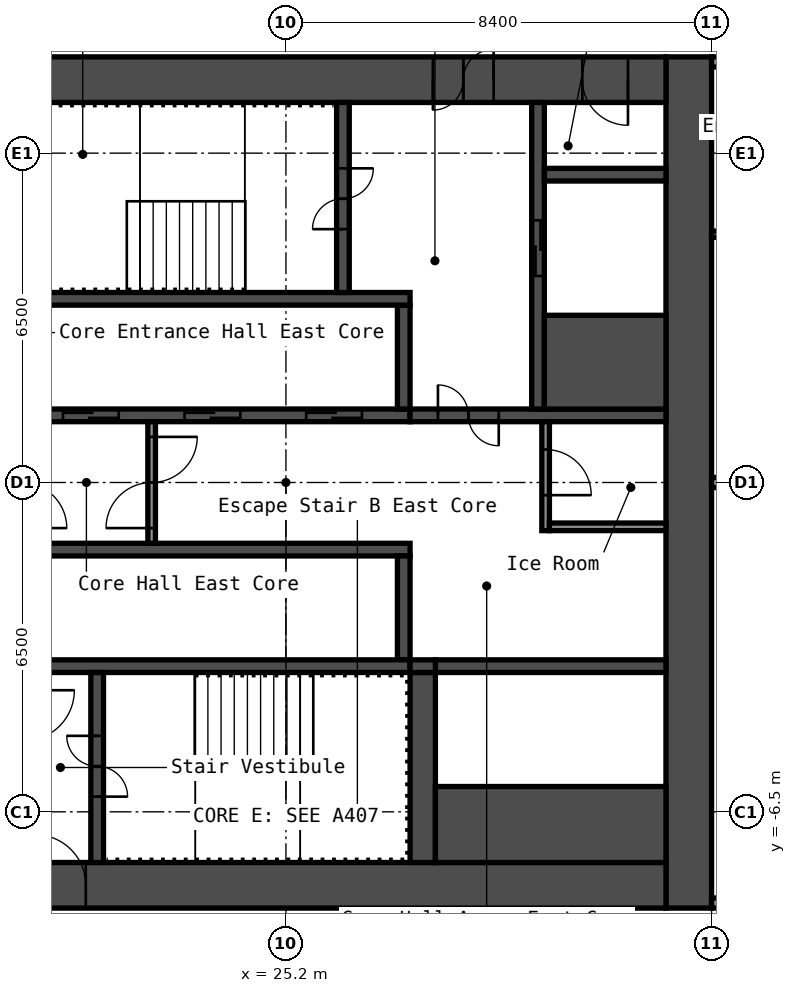
"""IFC4 building model, lengths in metres.
Left out: names, types, materials, properties, quantities, classifications, styles, units other than length and angle.
Written with IfcOpenShell. Run it as: python <this file> out.ifc"""

import sys

from ifc_helpers import new_model, si_unit, direction, frame, frame_2d, origin, place, context, subcontext, project, spatial, rectangle, extrude, element, fill, save


model = new_model("IFC4")
c1 = context("Model", 3, precision=1e-05, world=origin(), true_north=direction((0.0, 1.0)))
c2 = subcontext(c1, "Body", "Model", "MODEL_VIEW")
j1 = project(units=[si_unit("LENGTHUNIT", "METRE"), si_unit("PLANEANGLEUNIT", "RADIAN")], contexts=[c1])
p1 = place(None, origin())
s1 = spatial("IfcSite", under=j1, at=p1, CompositionType="ELEMENT")
p2 = place(p1, origin())
s2 = spatial("IfcBuilding", under=s1, at=p2, CompositionType="ELEMENT")
p3 = place(p2, frame((0.0, 0.0, 51.8)))
s3 = spatial("IfcBuildingStorey", under=s2, at=p3, CompositionType="ELEMENT", Elevation=51.8)
p4 = place(p3, frame((33.15, -8.4, 0.0), z_axis=(0.0, 0.0, 1.0), x_axis=(0.0, 1.0, 0.0)))
e1 = element("IfcWall", 1, at=p4, inside=s3, PredefinedType="SHEAR", context=c2, shape_type="SweptSolid", body=[
    extrude(rectangle(XDim=16.8, YDim=0.9, at=frame_2d((8.4, 0.0))), origin(), (0.0, 0.0, 1.0), 2.8),
])
p5 = place(p3, frame((17.7, 7.95, 0.0), z_axis=(0.0, 0.0, 1.0), x_axis=(1.0, 0.0, 0.0)))
e2 = element("IfcWall", 2, at=p5, inside=s3, PredefinedType="SHEAR", context=c2, shape_type="SweptSolid", body=[
    extrude(rectangle(XDim=15.0, YDim=0.9, at=frame_2d((7.5, 0.0))), origin(), (0.0, 0.0, 1.0), 2.8),
])
p6 = place(p5, frame((10.4, 0.0, 0.0)))
e3 = element("IfcOpeningElement", 3, at=p6, cuts=e2, PredefinedType="OPENING", context=c2, shape_type="SweptSolid", body=[
    extrude(rectangle(XDim=1.2, YDim=2.1, at=frame_2d((0.6, 1.05))), frame((0.0, 0.46, 0.0), z_axis=(0.0, -1.0, 0.0), x_axis=(1.0, 0.0, 0.0)), (0.0, 0.0, 1.0), 0.92),
])
p7 = place(p5, frame((13.35, 0.0, 0.0)))
e4 = element("IfcOpeningElement", 4, at=p7, cuts=e2, PredefinedType="OPENING", context=c2, shape_type="SweptSolid", body=[
    extrude(rectangle(XDim=0.9, YDim=2.1, at=frame_2d((0.45, 1.05))), frame((0.0, 0.46, 0.0), z_axis=(0.0, -1.0, 0.0), x_axis=(1.0, 0.0, 0.0)), (0.0, 0.0, 1.0), 0.92),
])
p8 = place(p3, frame((17.7, -7.95, 0.0), z_axis=(0.0, 0.0, 1.0), x_axis=(1.0, 0.0, 0.0)))
e5 = element("IfcWall", 5, at=p8, inside=s3, PredefinedType="SHEAR", context=c2, shape_type="SweptSolid", body=[
    extrude(rectangle(XDim=15.0, YDim=0.9, at=frame_2d((7.5, 0.0))), origin(), (0.0, 0.0, 1.0), 2.8),
])
p9 = place(p8, frame((2.55, 0.0, 0.0)))
e6 = element("IfcOpeningElement", 6, at=p9, cuts=e5, PredefinedType="OPENING", context=c2, shape_type="SweptSolid", body=[
    extrude(rectangle(XDim=1.0, YDim=2.1, at=frame_2d((0.5, 1.05))), frame((0.0, 0.46, 0.0), z_axis=(0.0, -1.0, 0.0), x_axis=(1.0, 0.0, 0.0)), (0.0, 0.0, 1.0), 0.92),
])
p10 = place(p3, frame((20.15, 1.325, 0.0), z_axis=(0.0, 0.0, 1.0), x_axis=(1.0, 0.0, 0.0)))
e7 = element("IfcWall", 7, at=p10, inside=s3, PredefinedType="SHEAR", context=c2, shape_type="SweptSolid", body=[
    extrude(rectangle(XDim=7.5, YDim=0.25, at=frame_2d((3.75, 0.0))), origin(), (0.0, 0.0, 1.0), 2.8),
])
p11 = place(p10, frame((0.65, 0.0, 0.0)))
e8 = element("IfcOpeningElement", 8, at=p11, cuts=e7, PredefinedType="OPENING", context=c2, shape_type="SweptSolid", body=[
    extrude(rectangle(XDim=1.1, YDim=2.1, at=frame_2d((0.55, 1.05))), frame((0.0, 0.135, 0.0), z_axis=(0.0, -1.0, 0.0), x_axis=(1.0, 0.0, 0.0)), (0.0, 0.0, 1.0), 0.27),
])
p12 = place(p10, frame((3.05, 0.0, 0.0)))
e9 = element("IfcOpeningElement", 9, at=p12, cuts=e7, PredefinedType="OPENING", context=c2, shape_type="SweptSolid", body=[
    extrude(rectangle(XDim=1.1, YDim=2.1, at=frame_2d((0.55, 1.05))), frame((0.0, 0.135, 0.0), z_axis=(0.0, -1.0, 0.0), x_axis=(1.0, 0.0, 0.0)), (0.0, 0.0, 1.0), 0.27),
])
p13 = place(p10, frame((5.45, 0.0, 0.0)))
e10 = element("IfcOpeningElement", 10, at=p13, cuts=e7, PredefinedType="OPENING", context=c2, shape_type="SweptSolid", body=[
    extrude(rectangle(XDim=1.1, YDim=2.1, at=frame_2d((0.55, 1.05))), frame((0.0, 0.135, 0.0), z_axis=(0.0, -1.0, 0.0), x_axis=(1.0, 0.0, 0.0)), (0.0, 0.0, 1.0), 0.27),
])
p14 = place(p3, frame((27.525, 1.45, 0.0), z_axis=(0.0, 0.0, 1.0), x_axis=(0.0, 1.0, 0.0)))
e11 = element("IfcWall", 11, at=p14, inside=s3, PredefinedType="SHEAR", context=c2, shape_type="SweptSolid", body=[
    extrude(rectangle(XDim=2.05, YDim=0.25, at=frame_2d((1.025, 0.0))), origin(), (0.0, 0.0, 1.0), 2.8),
])
p15 = place(p3, frame((20.15, 3.625, 0.0), z_axis=(0.0, 0.0, 1.0), x_axis=(1.0, 0.0, 0.0)))
e12 = element("IfcWall", 12, at=p15, inside=s3, PredefinedType="SHEAR", context=c2, shape_type="SweptSolid", body=[
    extrude(rectangle(XDim=7.5, YDim=0.25, at=frame_2d((3.75, 0.0))), origin(), (0.0, 0.0, 1.0), 2.8),
])
p16 = place(p3, frame((26.325, 3.75, 0.0), z_axis=(0.0, 0.0, 1.0), x_axis=(0.0, 1.0, 0.0)))
e13 = element("IfcWall", 13, at=p16, inside=s3, PredefinedType="SHEAR", context=c2, shape_type="SweptSolid", body=[
    extrude(rectangle(XDim=3.75, YDim=0.25, at=frame_2d((1.875, 0.0))), origin(), (0.0, 0.0, 1.0), 2.8),
])
p17 = place(p16, frame((1.25, 0.0, 0.0)))
e14 = element("IfcOpeningElement", 14, at=p17, cuts=e13, PredefinedType="OPENING", context=c2, shape_type="SweptSolid", body=[
    extrude(rectangle(XDim=1.2, YDim=2.1, at=frame_2d((0.6, 1.05))), frame((0.0, 0.135, 0.0), z_axis=(0.0, -1.0, 0.0), x_axis=(1.0, 0.0, 0.0)), (0.0, 0.0, 1.0), 0.27),
])
p18 = place(p3, frame((27.65, 1.325, 0.0), z_axis=(0.0, 0.0, 1.0), x_axis=(1.0, 0.0, 0.0)))
e15 = element("IfcWall", 15, at=p18, inside=s3, PredefinedType="SHEAR", context=c2, shape_type="SweptSolid", body=[
    extrude(rectangle(XDim=5.05, YDim=0.25, at=frame_2d((2.525, 0.0))), origin(), (0.0, 0.0, 1.0), 2.8),
])
p19 = place(p18, frame((0.55, 0.0, 0.0)))
e16 = element("IfcOpeningElement", 16, at=p19, cuts=e15, PredefinedType="OPENING", context=c2, shape_type="SweptSolid", body=[
    extrude(rectangle(XDim=1.2, YDim=2.1, at=frame_2d((0.6, 1.05))), frame((0.0, 0.135, 0.0), z_axis=(0.0, -1.0, 0.0), x_axis=(1.0, 0.0, 0.0)), (0.0, 0.0, 1.0), 0.27),
])
p20 = place(p3, frame((30.175, 1.45, 0.0), z_axis=(0.0, 0.0, 1.0), x_axis=(0.0, 1.0, 0.0)))
e17 = element("IfcWall", 17, at=p20, inside=s3, PredefinedType="SHEAR", context=c2, shape_type="SweptSolid", body=[
    extrude(rectangle(XDim=6.05, YDim=0.25, at=frame_2d((3.025, 0.0))), origin(), (0.0, 0.0, 1.0), 2.8),
])
p21 = place(p20, frame((2.625, 0.0, 0.0)))
e18 = element("IfcOpeningElement", 18, at=p21, cuts=e17, PredefinedType="OPENING", context=c2, shape_type="SweptSolid", body=[
    extrude(rectangle(XDim=1.1, YDim=2.1, at=frame_2d((0.55, 1.05))), frame((0.0, 0.135, 0.0), z_axis=(0.0, -1.0, 0.0), x_axis=(1.0, 0.0, 0.0)), (0.0, 0.0, 1.0), 0.27),
])
p22 = place(p3, frame((30.3, 2.375, 0.0), z_axis=(0.0, 0.0, 1.0), x_axis=(1.0, 0.0, 0.0)))
e19 = element("IfcWall", 19, at=p22, inside=s3, PredefinedType="SHEAR", context=c2, shape_type="SweptSolid", body=[
    extrude(rectangle(XDim=2.4, YDim=1.85, at=frame_2d((1.2, 0.0))), origin(), (0.0, 0.0, 1.0), 2.8),
])
p23 = place(p3, frame((30.3, 6.075, 0.0), z_axis=(0.0, 0.0, 1.0), x_axis=(1.0, 0.0, 0.0)))
e20 = element("IfcWall", 20, at=p23, inside=s3, PredefinedType="SHEAR", context=c2, shape_type="SweptSolid", body=[
    extrude(rectangle(XDim=2.4, YDim=0.25, at=frame_2d((1.2, 0.0))), origin(), (0.0, 0.0, 1.0), 2.8),
])
p24 = place(p3, frame((20.15, -1.325, 0.0), z_axis=(0.0, 0.0, 1.0), x_axis=(1.0, 0.0, 0.0)))
e21 = element("IfcWall", 21, at=p24, inside=s3, PredefinedType="SHEAR", context=c2, shape_type="SweptSolid", body=[
    extrude(rectangle(XDim=7.5, YDim=0.25, at=frame_2d((3.75, 0.0))), origin(), (0.0, 0.0, 1.0), 2.8),
])
p25 = place(p3, frame((27.525, -3.5, 0.0), z_axis=(0.0, 0.0, 1.0), x_axis=(0.0, 1.0, 0.0)))
e22 = element("IfcWall", 22, at=p25, inside=s3, PredefinedType="SHEAR", context=c2, shape_type="SweptSolid", body=[
    extrude(rectangle(XDim=2.05, YDim=0.25, at=frame_2d((1.025, 0.0))), origin(), (0.0, 0.0, 1.0), 2.8),
])
p26 = place(p3, frame((20.15, -3.625, 0.0), z_axis=(0.0, 0.0, 1.0), x_axis=(1.0, 0.0, 0.0)))
e23 = element("IfcWall", 23, at=p26, inside=s3, PredefinedType="SHEAR", context=c2, shape_type="SweptSolid", body=[
    extrude(rectangle(XDim=7.5, YDim=0.25, at=frame_2d((3.75, 0.0))), origin(), (0.0, 0.0, 1.0), 2.8),
])
p27 = place(p3, frame((21.475, -7.5, 0.0), z_axis=(0.0, 0.0, 1.0), x_axis=(0.0, 1.0, 0.0)))
e24 = element("IfcWall", 24, at=p27, inside=s3, PredefinedType="SHEAR", context=c2, shape_type="SweptSolid", body=[
    extrude(rectangle(XDim=3.75, YDim=0.25, at=frame_2d((1.875, 0.0))), origin(), (0.0, 0.0, 1.0), 2.8),
])
p28 = place(p27, frame((1.3, 0.0, 0.0)))
e25 = element("IfcOpeningElement", 25, at=p28, cuts=e24, PredefinedType="OPENING", context=c2, shape_type="SweptSolid", body=[
    extrude(rectangle(XDim=1.2, YDim=2.1, at=frame_2d((0.6, 1.05))), frame((0.0, 0.135, 0.0), z_axis=(0.0, -1.0, 0.0), x_axis=(1.0, 0.0, 0.0)), (0.0, 0.0, 1.0), 0.27),
])
p29 = place(p3, frame((27.9, -7.5, 0.0), z_axis=(0.0, 0.0, 1.0), x_axis=(0.0, 1.0, 0.0)))
e26 = element("IfcWall", 26, at=p29, inside=s3, PredefinedType="SHEAR", context=c2, shape_type="SweptSolid", body=[
    extrude(rectangle(XDim=3.75, YDim=0.5, at=frame_2d((1.875, 0.0))), origin(), (0.0, 0.0, 1.0), 2.8),
])
p30 = place(p3, frame((28.15, -3.625, 0.0), z_axis=(0.0, 0.0, 1.0), x_axis=(1.0, 0.0, 0.0)))
e27 = element("IfcWall", 27, at=p30, inside=s3, PredefinedType="SHEAR", context=c2, shape_type="SweptSolid", body=[
    extrude(rectangle(XDim=4.55, YDim=0.25, at=frame_2d((2.275, 0.0))), origin(), (0.0, 0.0, 1.0), 2.8),
])
p31 = place(p3, frame((28.15, -6.75, 0.0), z_axis=(0.0, 0.0, 1.0), x_axis=(1.0, 0.0, 0.0)))
e28 = element("IfcWall", 28, at=p31, inside=s3, PredefinedType="SHEAR", context=c2, shape_type="SweptSolid", body=[
    extrude(rectangle(XDim=4.55, YDim=1.5, at=frame_2d((2.275, 0.0))), origin(), (0.0, 0.0, 1.0), 2.8),
])
p32 = place(p3, frame((27.65, -3.625, 0.0), z_axis=(0.0, 0.0, 1.0), x_axis=(1.0, 0.0, 0.0)))
e29 = element("IfcWall", 29, at=p32, inside=s3, PredefinedType="SHEAR", context=c2, shape_type="SweptSolid", body=[
    extrude(rectangle(XDim=0.5, YDim=0.25, at=frame_2d((0.25, 0.0))), origin(), (0.0, 0.0, 1.0), 2.8),
])
p33 = place(p3, frame((22.55, -1.2, 0.0), z_axis=(0.0, 0.0, 1.0), x_axis=(0.0, 1.0, 0.0)))
e30 = element("IfcWall", 30, at=p33, inside=s3, PredefinedType="PARTITIONING", context=c2, shape_type="SweptSolid", body=[
    extrude(rectangle(XDim=2.4, YDim=0.15, at=frame_2d((1.2, 0.0))), origin(), (0.0, 0.0, 1.0), 2.8),
])
p34 = place(p33, frame((0.3, 0.0, 0.0)))
e31 = element("IfcOpeningElement", 31, at=p34, cuts=e30, PredefinedType="OPENING", context=c2, shape_type="SweptSolid", body=[
    extrude(rectangle(XDim=1.8, YDim=2.1, at=frame_2d((0.9, 1.05))), frame((0.0, 0.085, 0.0), z_axis=(0.0, -1.0, 0.0), x_axis=(1.0, 0.0, 0.0)), (0.0, 0.0, 1.0), 0.17),
])
p35 = place(p3, frame((30.325, -0.95, 0.0), z_axis=(0.0, 0.0, 1.0), x_axis=(0.0, 1.0, 0.0)))
e32 = element("IfcWall", 32, at=p35, inside=s3, PredefinedType="PARTITIONING", context=c2, shape_type="SweptSolid", body=[
    extrude(rectangle(XDim=2.15, YDim=0.15, at=frame_2d((1.075, 0.0))), origin(), (0.0, 0.0, 1.0), 2.8),
])
p36 = place(p35, frame((0.7, 0.0, 0.0)))
e33 = element("IfcOpeningElement", 33, at=p36, cuts=e32, PredefinedType="OPENING", context=c2, shape_type="SweptSolid", body=[
    extrude(rectangle(XDim=0.9, YDim=2.1, at=frame_2d((0.45, 1.05))), frame((0.0, 0.085, 0.0), z_axis=(0.0, -1.0, 0.0), x_axis=(1.0, 0.0, 0.0)), (0.0, 0.0, 1.0), 0.17),
])
p37 = place(p3, frame((30.4, -0.875, 0.0), z_axis=(0.0, 0.0, 1.0), x_axis=(1.0, 0.0, 0.0)))
e34 = element("IfcWall", 34, at=p37, inside=s3, PredefinedType="PARTITIONING", context=c2, shape_type="SweptSolid", body=[
    extrude(rectangle(XDim=2.3, YDim=0.15, at=frame_2d((1.15, 0.0))), origin(), (0.0, 0.0, 1.0), 2.8),
])
p38 = place(p3, frame((33.6, -8.3, 0.0), z_axis=(0.0, 0.0, 1.0), x_axis=(1.0, 0.0, 0.0)))
e35 = element("IfcWall", 35, at=p38, inside=s3, PredefinedType="PARTITIONING", context=c2, shape_type="SweptSolid", body=[
    extrude(rectangle(XDim=15.0, YDim=0.2, at=frame_2d((7.5, 0.0))), origin(), (0.0, 0.0, 1.0), 2.8),
])
p39 = place(p38, frame((2.0, 0.0, 0.0)))
e36 = element("IfcOpeningElement", 36, at=p39, cuts=e35, PredefinedType="OPENING", context=c2, shape_type="SweptSolid", body=[
    extrude(rectangle(XDim=1.0, YDim=2.1, at=frame_2d((0.5, 1.05))), frame((0.0, 0.11, 0.0), z_axis=(0.0, -1.0, 0.0), x_axis=(1.0, 0.0, 0.0)), (0.0, 0.0, 1.0), 0.22),
])
p40 = place(p38, frame((12.85, 0.0, 0.0)))
e37 = element("IfcOpeningElement", 37, at=p40, cuts=e35, PredefinedType="OPENING", context=c2, shape_type="SweptSolid", body=[
    extrude(rectangle(XDim=1.0, YDim=2.1, at=frame_2d((0.5, 1.05))), frame((0.0, 0.11, 0.0), z_axis=(0.0, -1.0, 0.0), x_axis=(1.0, 0.0, 0.0)), (0.0, 0.0, 1.0), 0.22),
])
p41 = place(p3, frame((33.6, 0.0, 0.0), z_axis=(0.0, 0.0, 1.0), x_axis=(1.0, 0.0, 0.0)))
e38 = element("IfcWall", 38, at=p41, inside=s3, PredefinedType="PARTITIONING", context=c2, shape_type="SweptSolid", body=[
    extrude(rectangle(XDim=14.9, YDim=0.2, at=frame_2d((7.45, 0.0))), origin(), (0.0, 0.0, 1.0), 2.8),
])
p42 = place(p3, frame((33.6, 4.9, 0.0), z_axis=(0.0, 0.0, 1.0), x_axis=(1.0, 0.0, 0.0)))
e39 = element("IfcWall", 39, at=p42, inside=s3, PredefinedType="PARTITIONING", context=c2, shape_type="SweptSolid", body=[
    extrude(rectangle(XDim=3.737, YDim=0.125, at=frame_2d((1.869, 0.0))), origin(), (0.0, 0.0, 1.0), 2.8),
])
p43 = place(p42, frame((1.5, 0.0, 0.0)))
e40 = element("IfcOpeningElement", 40, at=p43, cuts=e39, PredefinedType="OPENING", context=c2, shape_type="SweptSolid", body=[
    extrude(rectangle(XDim=0.8, YDim=2.1, at=frame_2d((0.4, 1.05))), frame((0.0, 0.073, 0.0), z_axis=(0.0, -1.0, 0.0), x_axis=(1.0, 0.0, 0.0)), (0.0, 0.0, 1.0), 0.145),
])
p44 = place(p3, frame((33.6, 8.3, 0.0), z_axis=(0.0, 0.0, 1.0), x_axis=(1.0, 0.0, 0.0)))
e41 = element("IfcWall", 41, at=p44, inside=s3, PredefinedType="PARTITIONING", context=c2, shape_type="SweptSolid", body=[
    extrude(rectangle(XDim=15.0, YDim=0.2, at=frame_2d((7.5, 0.0))), origin(), (0.0, 0.0, 1.0), 2.8),
])
p45 = place(p44, frame((9.55, 0.0, 0.0)))
e42 = element("IfcOpeningElement", 42, at=p45, cuts=e41, PredefinedType="OPENING", context=c2, shape_type="SweptSolid", body=[
    extrude(rectangle(XDim=1.6, YDim=2.1, at=frame_2d((0.8, 1.05))), frame((0.0, 0.11, 0.0), z_axis=(0.0, -1.0, 0.0), x_axis=(1.0, 0.0, 0.0)), (0.0, 0.0, 1.0), 0.22),
])
p46 = place(p6, origin())
e43 = element("IfcDoor", 43, at=p46, inside=s3, OperationType="DOUBLE_DOOR_SINGLE_SWING", PredefinedType="DOOR", context=c2, shape_type="SweptSolid", body=[
    extrude(rectangle(XDim=1.2, YDim=2.1, at=frame_2d((0.6, 1.05))), frame((0.0, 0.025, 0.0), z_axis=(0.0, -1.0, 0.0), x_axis=(1.0, 0.0, 0.0)), (0.0, 0.0, 1.0), 0.05),
])
fill(e3, e43)
p47 = place(p7, origin())
e44 = element("IfcDoor", 44, at=p47, inside=s3, OperationType="SINGLE_SWING_RIGHT", PredefinedType="DOOR", context=c2, shape_type="SweptSolid", body=[
    extrude(rectangle(XDim=0.9, YDim=2.1, at=frame_2d((0.45, 1.05))), frame((0.0, 0.025, 0.0), z_axis=(0.0, -1.0, 0.0), x_axis=(1.0, 0.0, 0.0)), (0.0, 0.0, 1.0), 0.05),
])
fill(e4, e44)
p48 = place(p9, origin())
e45 = element("IfcDoor", 45, at=p48, inside=s3, OperationType="SINGLE_SWING_RIGHT", PredefinedType="DOOR", context=c2, shape_type="SweptSolid", body=[
    extrude(rectangle(XDim=1.0, YDim=2.1, at=frame_2d((0.5, 1.05))), frame((0.0, 0.025, 0.0), z_axis=(0.0, -1.0, 0.0), x_axis=(1.0, 0.0, 0.0)), (0.0, 0.0, 1.0), 0.05),
])
fill(e6, e45)
p49 = place(p17, origin())
e46 = element("IfcDoor", 46, at=p49, inside=s3, OperationType="DOUBLE_DOOR_SINGLE_SWING", PredefinedType="DOOR", context=c2, shape_type="SweptSolid", body=[
    extrude(rectangle(XDim=1.2, YDim=2.1, at=frame_2d((0.6, 1.05))), frame((0.0, 0.025, 0.0), z_axis=(0.0, -1.0, 0.0), x_axis=(1.0, 0.0, 0.0)), (0.0, 0.0, 1.0), 0.05),
])
fill(e14, e46)
p50 = place(p28, origin())
e47 = element("IfcDoor", 47, at=p50, inside=s3, OperationType="DOUBLE_DOOR_SINGLE_SWING", PredefinedType="DOOR", context=c2, shape_type="SweptSolid", body=[
    extrude(rectangle(XDim=1.2, YDim=2.1, at=frame_2d((0.6, 1.05))), frame((0.0, 0.025, 0.0), z_axis=(0.0, -1.0, 0.0), x_axis=(1.0, 0.0, 0.0)), (0.0, 0.0, 1.0), 0.05),
])
fill(e25, e47)
p51 = place(p19, origin())
e48 = element("IfcDoor", 48, at=p51, inside=s3, OperationType="DOUBLE_DOOR_SINGLE_SWING", PredefinedType="DOOR", context=c2, shape_type="SweptSolid", body=[
    extrude(rectangle(XDim=1.2, YDim=2.1, at=frame_2d((0.6, 1.05))), frame((0.0, 0.025, 0.0), z_axis=(0.0, -1.0, 0.0), x_axis=(1.0, 0.0, 0.0)), (0.0, 0.0, 1.0), 0.05),
])
fill(e16, e48)
p52 = place(p34, origin())
e49 = element("IfcDoor", 49, at=p52, inside=s3, OperationType="DOUBLE_DOOR_SINGLE_SWING", PredefinedType="DOOR", context=c2, shape_type="SweptSolid", body=[
    extrude(rectangle(XDim=1.8, YDim=2.1, at=frame_2d((0.9, 1.05))), frame((0.0, 0.025, 0.0), z_axis=(0.0, -1.0, 0.0), x_axis=(1.0, 0.0, 0.0)), (0.0, 0.0, 1.0), 0.05),
])
fill(e31, e49)
p53 = place(p36, origin())
e50 = element("IfcDoor", 50, at=p53, inside=s3, OperationType="SINGLE_SWING_LEFT", PredefinedType="DOOR", context=c2, shape_type="SweptSolid", body=[
    extrude(rectangle(XDim=0.9, YDim=2.1, at=frame_2d((0.45, 1.05))), frame((0.0, 0.025, 0.0), z_axis=(0.0, -1.0, 0.0), x_axis=(1.0, 0.0, 0.0)), (0.0, 0.0, 1.0), 0.05),
])
fill(e33, e50)
p54 = place(p11, origin())
e51 = element("IfcDoor", 51, at=p54, inside=s3, OperationType="DOUBLE_DOOR_SLIDING", PredefinedType="DOOR", context=c2, shape_type="SweptSolid", body=[
    extrude(rectangle(XDim=1.1, YDim=2.1, at=frame_2d((0.55, 1.05))), frame((0.0, 0.025, 0.0), z_axis=(0.0, -1.0, 0.0), x_axis=(1.0, 0.0, 0.0)), (0.0, 0.0, 1.0), 0.05),
])
fill(e8, e51)
p55 = place(p12, origin())
e52 = element("IfcDoor", 52, at=p55, inside=s3, OperationType="DOUBLE_DOOR_SLIDING", PredefinedType="DOOR", context=c2, shape_type="SweptSolid", body=[
    extrude(rectangle(XDim=1.1, YDim=2.1, at=frame_2d((0.55, 1.05))), frame((0.0, 0.025, 0.0), z_axis=(0.0, -1.0, 0.0), x_axis=(1.0, 0.0, 0.0)), (0.0, 0.0, 1.0), 0.05),
])
fill(e9, e52)
p56 = place(p13, origin())
e53 = element("IfcDoor", 53, at=p56, inside=s3, OperationType="DOUBLE_DOOR_SLIDING", PredefinedType="DOOR", context=c2, shape_type="SweptSolid", body=[
    extrude(rectangle(XDim=1.1, YDim=2.1, at=frame_2d((0.55, 1.05))), frame((0.0, 0.025, 0.0), z_axis=(0.0, -1.0, 0.0), x_axis=(1.0, 0.0, 0.0)), (0.0, 0.0, 1.0), 0.05),
])
fill(e10, e53)
p57 = place(p21, origin())
e54 = element("IfcDoor", 54, at=p57, inside=s3, OperationType="DOUBLE_DOOR_SLIDING", PredefinedType="DOOR", context=c2, shape_type="SweptSolid", body=[
    extrude(rectangle(XDim=1.1, YDim=2.1, at=frame_2d((0.55, 1.05))), frame((0.0, 0.025, 0.0), z_axis=(0.0, -1.0, 0.0), x_axis=(1.0, 0.0, 0.0)), (0.0, 0.0, 1.0), 0.05),
])
fill(e18, e54)
save(model, sys.argv[1])
